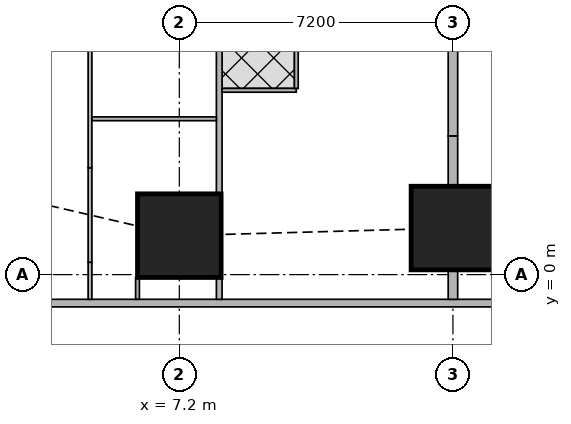
"""IFC4 building model, lengths in metres.
Left out: names, types, materials, properties, quantities, classifications, styles, units other than length and angle.
Written with IfcOpenShell. Run it as: python <this file> out.ifc"""

import sys

from ifc_helpers import new_model, si_unit, direction, frame, frame_2d, origin, origin_2d, place, context, subcontext, project, spatial, rectangle, extrude, element, fill, save


model = new_model("IFC4")
c1 = context("Model", 3, precision=1e-05, world=origin(), true_north=direction((0.0, 1.0)))
c2 = subcontext(c1, "Body", "Model", "MODEL_VIEW")
j1 = project(units=[si_unit("LENGTHUNIT", "METRE"), si_unit("PLANEANGLEUNIT", "RADIAN")], contexts=[c1])
p1 = place(None, origin())
s1 = spatial("IfcSite", under=j1, at=p1, CompositionType="ELEMENT")
p2 = place(p1, origin())
s2 = spatial("IfcBuilding", under=s1, at=p2, CompositionType="ELEMENT")
p3 = place(p2, frame((0.0, 0.0, 81.65)))
s3 = spatial("IfcBuildingStorey", under=s2, at=p3, CompositionType="ELEMENT", Elevation=81.65)
for number, where, z_axis, x_axis in (
    (1, (7.2, 1.025, 0.0), (0.0, 0.0, 1.0), (1.0, 0.0, 0.0)),
    (2, (14.4, 1.225, 0.0), (0.0, 0.0, 1.0), (1.0, 0.0, 0.0)),
):
    element("IfcColumn", number, at=place(p3, frame(where, z_axis=z_axis, x_axis=x_axis)), inside=s3, PredefinedType="COLUMN", context=c2, shape_type="SweptSolid", body=[
        extrude(rectangle(XDim=2.2, YDim=2.2, at=origin_2d()), origin(), (0.0, 0.0, 1.0), 3.75),
    ])
p4 = place(p3, frame((2.163, -0.75, 0.0), z_axis=(0.0, 0.0, 1.0), x_axis=(1.0, 0.0, 0.0)))
e3 = element("IfcWall", 3, at=p4, inside=s3, PredefinedType="SOLIDWALL", context=c2, shape_type="SweptSolid", body=[
    extrude(rectangle(XDim=45.628, YDim=0.2, at=frame_2d((22.814, 0.0))), origin(), (0.0, 0.0, 1.0), 3.5),
])
p5 = place(p4, frame((9.537, 0.0, 0.9)))
e4 = element("IfcOpeningElement", 4, at=p5, cuts=e3, PredefinedType="OPENING", context=c2, shape_type="SweptSolid", body=[
    extrude(rectangle(XDim=1.8, YDim=1.5, at=frame_2d((0.9, 0.75))), frame((0.0, 0.11, 0.0), z_axis=(0.0, -1.0, 0.0), x_axis=(1.0, 0.0, 0.0)), (0.0, 0.0, 1.0), 0.22),
])
p6 = place(p4, frame((13.137, 0.0, 0.9)))
e5 = element("IfcOpeningElement", 5, at=p6, cuts=e3, PredefinedType="OPENING", context=c2, shape_type="SweptSolid", body=[
    extrude(rectangle(XDim=1.8, YDim=1.5, at=frame_2d((0.9, 0.75))), frame((0.0, 0.11, 0.0), z_axis=(0.0, -1.0, 0.0), x_axis=(1.0, 0.0, 0.0)), (0.0, 0.0, 1.0), 0.22),
])
p7 = place(p4, frame((16.737, 0.0, 0.9)))
e6 = element("IfcOpeningElement", 6, at=p7, cuts=e3, PredefinedType="OPENING", context=c2, shape_type="SweptSolid", body=[
    extrude(rectangle(XDim=1.8, YDim=1.5, at=frame_2d((0.9, 0.75))), frame((0.0, 0.11, 0.0), z_axis=(0.0, -1.0, 0.0), x_axis=(1.0, 0.0, 0.0)), (0.0, 0.0, 1.0), 0.22),
])
p8 = place(p4, frame((20.337, 0.0, 0.9)))
e7 = element("IfcOpeningElement", 7, at=p8, cuts=e3, PredefinedType="OPENING", context=c2, shape_type="SweptSolid", body=[
    extrude(rectangle(XDim=1.8, YDim=1.5, at=frame_2d((0.9, 0.75))), frame((0.0, 0.11, 0.0), z_axis=(0.0, -1.0, 0.0), x_axis=(1.0, 0.0, 0.0)), (0.0, 0.0, 1.0), 0.22),
])
p9 = place(p4, frame((23.937, 0.0, 0.9)))
e8 = element("IfcOpeningElement", 8, at=p9, cuts=e3, PredefinedType="OPENING", context=c2, shape_type="SweptSolid", body=[
    extrude(rectangle(XDim=1.8, YDim=1.5, at=frame_2d((0.9, 0.75))), frame((0.0, 0.11, 0.0), z_axis=(0.0, -1.0, 0.0), x_axis=(1.0, 0.0, 0.0)), (0.0, 0.0, 1.0), 0.22),
])
p10 = place(p4, frame((27.537, 0.0, 0.9)))
e9 = element("IfcOpeningElement", 9, at=p10, cuts=e3, PredefinedType="OPENING", context=c2, shape_type="SweptSolid", body=[
    extrude(rectangle(XDim=1.8, YDim=1.5, at=frame_2d((0.9, 0.75))), frame((0.0, 0.11, 0.0), z_axis=(0.0, -1.0, 0.0), x_axis=(1.0, 0.0, 0.0)), (0.0, 0.0, 1.0), 0.22),
])
p11 = place(p4, frame((31.137, 0.0, 0.9)))
e10 = element("IfcOpeningElement", 10, at=p11, cuts=e3, PredefinedType="OPENING", context=c2, shape_type="SweptSolid", body=[
    extrude(rectangle(XDim=1.8, YDim=1.5, at=frame_2d((0.9, 0.75))), frame((0.0, 0.11, 0.0), z_axis=(0.0, -1.0, 0.0), x_axis=(1.0, 0.0, 0.0)), (0.0, 0.0, 1.0), 0.22),
])
p12 = place(p4, frame((34.737, 0.0, 0.9)))
e11 = element("IfcOpeningElement", 11, at=p12, cuts=e3, PredefinedType="OPENING", context=c2, shape_type="SweptSolid", body=[
    extrude(rectangle(XDim=1.8, YDim=1.5, at=frame_2d((0.9, 0.75))), frame((0.0, 0.11, 0.0), z_axis=(0.0, -1.0, 0.0), x_axis=(1.0, 0.0, 0.0)), (0.0, 0.0, 1.0), 0.22),
])
p13 = place(p3, frame((8.25, -0.65, 0.0), z_axis=(0.0, 0.0, 1.0), x_axis=(0.0, 1.0, 0.0)))
e12 = element("IfcWall", 12, at=p13, inside=s3, PredefinedType="SOLIDWALL", context=c2, shape_type="SweptSolid", body=[
    extrude(rectangle(XDim=0.574, YDim=0.15, at=frame_2d((0.287, 0.0))), origin(), (0.0, 0.0, 1.0), 3.5),
])
p14 = place(p3, frame((8.25, 2.126, 0.0), z_axis=(0.0, 0.0, 1.0), x_axis=(0.0, 1.0, 0.0)))
e13 = element("IfcWall", 13, at=p14, inside=s3, PredefinedType="SOLIDWALL", context=c2, shape_type="SweptSolid", body=[
    extrude(rectangle(XDim=40.773, YDim=0.15, at=frame_2d((20.386, 0.0))), origin(), (0.0, 0.0, 1.0), 3.5),
])
p15 = place(p14, frame((17.787, 0.0, 0.0)))
e14 = element("IfcOpeningElement", 14, at=p15, cuts=e13, PredefinedType="OPENING", context=c2, shape_type="SweptSolid", body=[
    extrude(rectangle(XDim=1.0, YDim=2.1, at=frame_2d((0.5, 1.05))), frame((0.0, 0.085, 0.0), z_axis=(0.0, -1.0, 0.0), x_axis=(1.0, 0.0, 0.0)), (0.0, 0.0, 1.0), 0.17),
])
p16 = place(p14, frame((21.962, 0.0, 0.0)))
e15 = element("IfcOpeningElement", 15, at=p16, cuts=e13, PredefinedType="OPENING", context=c2, shape_type="SweptSolid", body=[
    extrude(rectangle(XDim=1.0, YDim=2.1, at=frame_2d((0.5, 1.05))), frame((0.0, 0.085, 0.0), z_axis=(0.0, -1.0, 0.0), x_axis=(1.0, 0.0, 0.0)), (0.0, 0.0, 1.0), 0.17),
])
p17 = place(p14, frame((32.787, 0.0, 0.0)))
e16 = element("IfcOpeningElement", 16, at=p17, cuts=e13, PredefinedType="OPENING", context=c2, shape_type="SweptSolid", body=[
    extrude(rectangle(XDim=1.0, YDim=2.1, at=frame_2d((0.5, 1.05))), frame((0.0, 0.085, 0.0), z_axis=(0.0, -1.0, 0.0), x_axis=(1.0, 0.0, 0.0)), (0.0, 0.0, 1.0), 0.17),
])
p18 = place(p3, frame((6.1, -0.65, 0.0), z_axis=(0.0, 0.0, 1.0), x_axis=(0.0, 1.0, 0.0)))
e17 = element("IfcWall", 17, at=p18, inside=s3, PredefinedType="PARTITIONING", context=c2, shape_type="SweptSolid", body=[
    extrude(rectangle(XDim=0.575, YDim=0.1, at=frame_2d((0.288, 0.0))), origin(), (0.0, 0.0, 1.0), 3.5),
])
p19 = place(p3, frame((4.85, -0.65, 0.0), z_axis=(0.0, 0.0, 1.0), x_axis=(0.0, 1.0, 0.0)))
e18 = element("IfcWall", 18, at=p19, inside=s3, PredefinedType="PARTITIONING", context=c2, shape_type="SweptSolid", body=[
    extrude(rectangle(XDim=0.976, YDim=0.1, at=frame_2d((0.488, 0.0))), origin(), (0.0, 0.0, 1.0), 3.5),
])
p20 = place(p3, frame((4.85, 0.326, 0.0), z_axis=(0.0, 0.0, 1.0), x_axis=(0.0, 1.0, 0.0)))
e19 = element("IfcWall", 19, at=p20, inside=s3, PredefinedType="PARTITIONING", context=c2, shape_type="SweptSolid", body=[
    extrude(rectangle(XDim=2.486, YDim=0.1, at=frame_2d((1.243, 0.0))), origin(), (0.0, 0.0, 1.0), 2.05),
])
p21 = place(p3, frame((4.85, 2.812, 0.0), z_axis=(0.0, 0.0, 1.0), x_axis=(0.0, 1.0, 0.0)))
e20 = element("IfcWall", 20, at=p21, inside=s3, PredefinedType="PARTITIONING", context=c2, shape_type="SweptSolid", body=[
    extrude(rectangle(XDim=15.938, YDim=0.1, at=frame_2d((7.969, 0.0))), origin(), (0.0, 0.0, 1.0), 3.5),
])
p22 = place(p21, frame((14.383, 0.0, 0.0)))
e21 = element("IfcOpeningElement", 21, at=p22, cuts=e20, PredefinedType="OPENING", context=c2, shape_type="SweptSolid", body=[
    extrude(rectangle(XDim=0.9, YDim=2.1, at=frame_2d((0.45, 1.05))), frame((0.0, 0.06, 0.0), z_axis=(0.0, -1.0, 0.0), x_axis=(1.0, 0.0, 0.0)), (0.0, 0.0, 1.0), 0.12),
])
p23 = place(p21, frame((10.938, 0.0, 0.0)))
e22 = element("IfcOpeningElement", 22, at=p23, cuts=e20, PredefinedType="OPENING", context=c2, shape_type="SweptSolid", body=[
    extrude(rectangle(XDim=0.9, YDim=2.1, at=frame_2d((0.45, 1.05))), frame((0.0, 0.06, 0.0), z_axis=(0.0, -1.0, 0.0), x_axis=(1.0, 0.0, 0.0)), (0.0, 0.0, 1.0), 0.12),
])
p24 = place(p21, frame((7.078, 0.0, 0.0)))
e23 = element("IfcOpeningElement", 23, at=p24, cuts=e20, PredefinedType="OPENING", context=c2, shape_type="SweptSolid", body=[
    extrude(rectangle(XDim=0.9, YDim=2.1, at=frame_2d((0.45, 1.05))), frame((0.0, 0.06, 0.0), z_axis=(0.0, -1.0, 0.0), x_axis=(1.0, 0.0, 0.0)), (0.0, 0.0, 1.0), 0.12),
])
p25 = place(p21, frame((2.363, 0.0, 0.0)))
e24 = element("IfcOpeningElement", 24, at=p25, cuts=e20, PredefinedType="OPENING", context=c2, shape_type="SweptSolid", body=[
    extrude(rectangle(XDim=0.9, YDim=2.1, at=frame_2d((0.45, 1.05))), frame((0.0, 0.06, 0.0), z_axis=(0.0, -1.0, 0.0), x_axis=(1.0, 0.0, 0.0)), (0.0, 0.0, 1.0), 0.12),
])
p26 = place(p21, frame((12.508, 0.0, 0.0)))
e25 = element("IfcOpeningElement", 25, at=p26, cuts=e20, PredefinedType="OPENING", context=c2, shape_type="SweptSolid", body=[
    extrude(rectangle(XDim=0.9, YDim=2.1, at=frame_2d((0.45, 1.05))), frame((0.0, 0.06, 0.0), z_axis=(0.0, -1.0, 0.0), x_axis=(1.0, 0.0, 0.0)), (0.0, 0.0, 1.0), 0.12),
])
p27 = place(p21, frame((9.063, 0.0, 0.0)))
e26 = element("IfcOpeningElement", 26, at=p27, cuts=e20, PredefinedType="OPENING", context=c2, shape_type="SweptSolid", body=[
    extrude(rectangle(XDim=0.9, YDim=2.1, at=frame_2d((0.45, 1.05))), frame((0.0, 0.06, 0.0), z_axis=(0.0, -1.0, 0.0), x_axis=(1.0, 0.0, 0.0)), (0.0, 0.0, 1.0), 0.12),
])
p28 = place(p21, frame((5.203, 0.0, 0.0)))
e27 = element("IfcOpeningElement", 27, at=p28, cuts=e20, PredefinedType="OPENING", context=c2, shape_type="SweptSolid", body=[
    extrude(rectangle(XDim=0.9, YDim=2.1, at=frame_2d((0.45, 1.05))), frame((0.0, 0.06, 0.0), z_axis=(0.0, -1.0, 0.0), x_axis=(1.0, 0.0, 0.0)), (0.0, 0.0, 1.0), 0.12),
])
p29 = place(p3, frame((10.279, 4.85, 0.0), z_axis=(0.0, 0.0, 1.0), x_axis=(-1.0, 0.0, 0.0)))
e28 = element("IfcWall", 28, at=p29, inside=s3, PredefinedType="PARTITIONING", context=c2, shape_type="SweptSolid", body=[
    extrude(rectangle(XDim=1.954, YDim=0.1, at=frame_2d((0.977, 0.0))), origin(), (0.0, 0.0, 1.0), 3.5),
])
p30 = place(p29, frame((0.579, 0.0, 0.0)))
e29 = element("IfcOpeningElement", 29, at=p30, cuts=e28, PredefinedType="OPENING", context=c2, shape_type="SweptSolid", body=[
    extrude(rectangle(XDim=0.9, YDim=2.1, at=frame_2d((0.45, 1.05))), frame((0.0, 0.06, 0.0), z_axis=(0.0, -1.0, 0.0), x_axis=(1.0, 0.0, 0.0)), (0.0, 0.0, 1.0), 0.12),
])
p31 = place(p3, frame((10.279, 4.9, 0.0), z_axis=(0.0, 0.0, 1.0), x_axis=(0.0, 1.0, 0.0)))
e30 = element("IfcWall", 30, at=p31, inside=s3, PredefinedType="PARTITIONING", context=c2, shape_type="SweptSolid", body=[
    extrude(rectangle(XDim=3.275, YDim=0.1, at=frame_2d((1.638, 0.0))), origin(), (0.0, 0.0, 1.0), 3.5),
])
p32 = place(p3, frame((14.4, -0.65, 0.0), z_axis=(0.0, 0.0, 1.0), x_axis=(0.0, 1.0, 0.0)))
e31 = element("IfcWall", 31, at=p32, inside=s3, PredefinedType="SOLIDWALL", context=c2, shape_type="SweptSolid", body=[
    extrude(rectangle(XDim=0.774, YDim=0.25, at=frame_2d((0.387, 0.0))), origin(), (0.0, 0.0, 1.0), 3.5),
])
p33 = place(p3, frame((14.4, 2.326, 0.0), z_axis=(0.0, 0.0, 1.0), x_axis=(0.0, 1.0, 0.0)))
e32 = element("IfcWall", 32, at=p33, inside=s3, PredefinedType="SOLIDWALL", context=c2, shape_type="SweptSolid", body=[
    extrude(rectangle(XDim=1.324, YDim=0.25, at=frame_2d((0.662, 0.0))), origin(), (0.0, 0.0, 1.0), 3.5),
])
p34 = place(p3, frame((14.4, 3.65, 0.0), z_axis=(0.0, 0.0, 1.0), x_axis=(0.0, 1.0, 0.0)))
e33 = element("IfcWall", 33, at=p34, inside=s3, PredefinedType="SOLIDWALL", context=c2, shape_type="SweptSolid", body=[
    extrude(rectangle(XDim=3.049, YDim=0.25, at=frame_2d((1.524, 0.0))), origin(), (0.0, 0.0, 1.0), 3.5),
])
p35 = place(p3, frame((8.175, 4.1, 0.0), z_axis=(0.0, 0.0, 1.0), x_axis=(-1.0, 0.0, 0.0)))
e34 = element("IfcWall", 34, at=p35, inside=s3, PredefinedType="PARTITIONING", context=c2, shape_type="SweptSolid", body=[
    extrude(rectangle(XDim=3.275, YDim=0.1, at=frame_2d((1.638, 0.0))), origin(), (0.0, 0.0, 1.0), 3.5),
])
p36 = place(p35, frame((1.175, 0.0, 0.0)))
e35 = element("IfcOpeningElement", 35, at=p36, cuts=e34, PredefinedType="OPENING", context=c2, shape_type="SweptSolid", body=[
    extrude(rectangle(XDim=0.9, YDim=2.1, at=frame_2d((0.45, 1.05))), frame((0.0, 0.06, 0.0), z_axis=(0.0, -1.0, 0.0), x_axis=(1.0, 0.0, 0.0)), (0.0, 0.0, 1.0), 0.12),
])
p37 = place(p5, origin())
e36 = element("IfcWindow", 36, at=p37, inside=s3, PartitioningType="SINGLE_PANEL", PredefinedType="WINDOW", context=c2, shape_type="SweptSolid", body=[
    extrude(rectangle(XDim=1.8, YDim=1.5, at=frame_2d((0.9, 0.75))), frame((0.0, 0.03, 0.0), z_axis=(0.0, -1.0, 0.0), x_axis=(1.0, 0.0, 0.0)), (0.0, 0.0, 1.0), 0.06),
])
fill(e4, e36)
p38 = place(p6, origin())
e37 = element("IfcWindow", 37, at=p38, inside=s3, PartitioningType="SINGLE_PANEL", PredefinedType="WINDOW", context=c2, shape_type="SweptSolid", body=[
    extrude(rectangle(XDim=1.8, YDim=1.5, at=frame_2d((0.9, 0.75))), frame((0.0, 0.03, 0.0), z_axis=(0.0, -1.0, 0.0), x_axis=(1.0, 0.0, 0.0)), (0.0, 0.0, 1.0), 0.06),
])
fill(e5, e37)
p39 = place(p25, origin())
e38 = element("IfcDoor", 38, at=p39, inside=s3, OperationType="SINGLE_SWING_RIGHT", PredefinedType="DOOR", context=c2, shape_type="SweptSolid", body=[
    extrude(rectangle(XDim=0.9, YDim=2.1, at=frame_2d((0.45, 1.05))), frame((0.0, 0.025, 0.0), z_axis=(0.0, -1.0, 0.0), x_axis=(1.0, 0.0, 0.0)), (0.0, 0.0, 1.0), 0.05),
])
fill(e24, e38)
p40 = place(p30, origin())
e39 = element("IfcDoor", 39, at=p40, inside=s3, OperationType="SINGLE_SWING_LEFT", PredefinedType="DOOR", context=c2, shape_type="SweptSolid", body=[
    extrude(rectangle(XDim=0.9, YDim=2.1, at=frame_2d((0.45, 1.05))), frame((0.0, 0.025, 0.0), z_axis=(0.0, -1.0, 0.0), x_axis=(1.0, 0.0, 0.0)), (0.0, 0.0, 1.0), 0.05),
])
fill(e29, e39)
p41 = place(p36, origin())
e40 = element("IfcDoor", 40, at=p41, inside=s3, OperationType="SINGLE_SWING_RIGHT", PredefinedType="DOOR", context=c2, shape_type="SweptSolid", body=[
    extrude(rectangle(XDim=0.9, YDim=2.1, at=frame_2d((0.45, 1.05))), frame((0.0, 0.025, 0.0), z_axis=(0.0, -1.0, 0.0), x_axis=(1.0, 0.0, 0.0)), (0.0, 0.0, 1.0), 0.05),
])
fill(e35, e40)
save(model, sys.argv[1])
